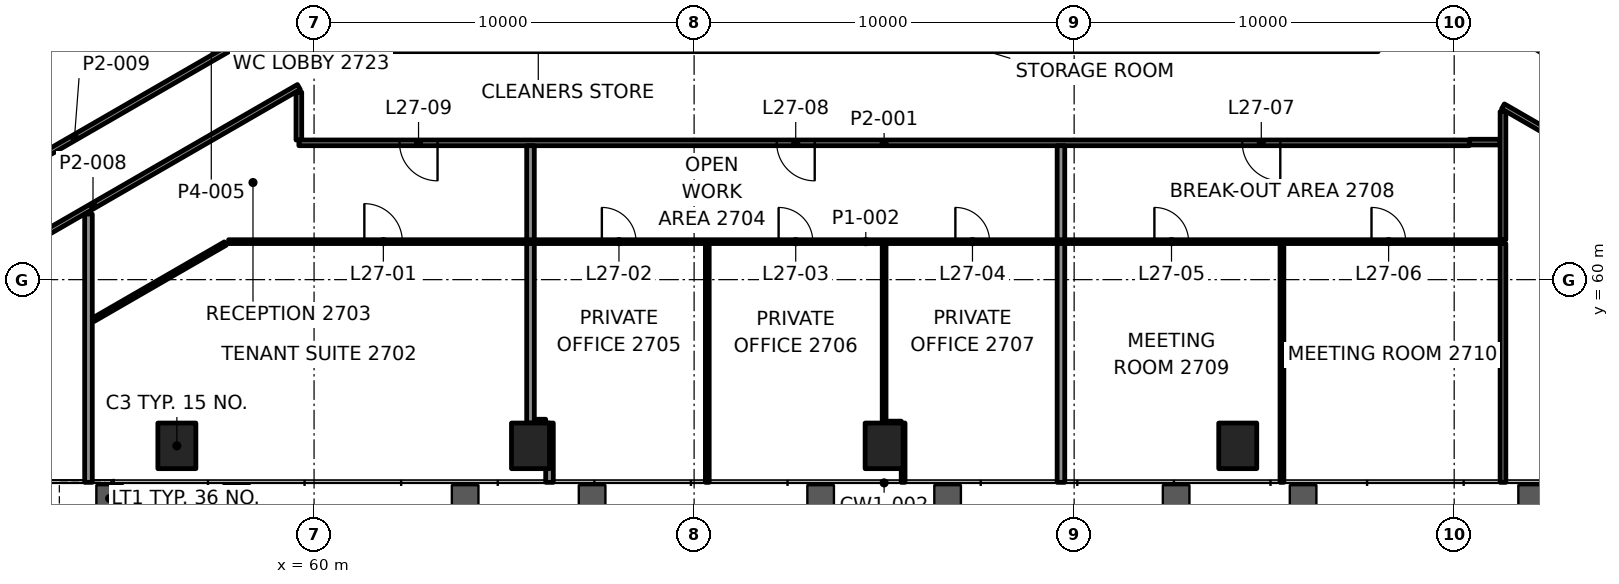
"""IFC4 building model, lengths in metres.
Left out: names, types, materials, properties, quantities, classifications, styles, units other than length and angle.
Written with IfcOpenShell. Run it as: python <this file> out.ifc"""

import sys

from ifc_helpers import new_model, si_unit, direction, frame, frame_2d, origin, origin_2d, place, context, subcontext, project, spatial, rectangle, extrude, element, fill, save


model = new_model("IFC4")
c1 = context("Model", 3, precision=1e-05, world=origin(), true_north=direction((0.0, 1.0)))
c2 = subcontext(c1, "Body", "Model", "MODEL_VIEW")
j1 = project(units=[si_unit("LENGTHUNIT", "METRE"), si_unit("PLANEANGLEUNIT", "RADIAN")], contexts=[c1])
p1 = place(None, origin())
s1 = spatial("IfcSite", under=j1, at=p1, CompositionType="ELEMENT")
p2 = place(p1, origin())
s2 = spatial("IfcBuilding", under=s1, at=p2, CompositionType="ELEMENT")
p3 = place(p2, frame((0.0, 0.0, 119.8)))
s3 = spatial("IfcBuildingStorey", under=s2, at=p3, CompositionType="ELEMENT", Elevation=119.8)
for number, where, z_axis, x_axis in (
    (1, (56.39, 55.626, -0.0), (0.0, 0.0, 1.0), (1.0, 0.0, 0.0)),
    (2, (65.695, 55.626, -0.0), (0.0, 0.0, 1.0), (1.0, 0.0, 0.0)),
    (3, (75.0, 55.626, -0.0), (0.0, 0.0, 1.0), (1.0, 0.0, 0.0)),
    (4, (84.305, 55.626, -0.0), (0.0, 0.0, 1.0), (1.0, 0.0, 0.0)),
):
    element("IfcColumn", number, at=place(p3, frame(where, z_axis=z_axis, x_axis=x_axis)), inside=s3, PredefinedType="COLUMN", context=c2, shape_type="SweptSolid", body=[
        extrude(rectangle(XDim=1.0, YDim=1.2, at=origin_2d()), origin(), (0.0, 0.0, 1.0), 4.2),
    ])
p4 = place(p3, frame((65.805, 56.226, 0.0), z_axis=(0.0, 0.0, 1.0), x_axis=(1.0, 0.0, 0.0)))
e5 = element("IfcWall", 5, at=p4, inside=s3, PredefinedType="PARTITIONING", context=c2, shape_type="SweptSolid", body=[
    extrude(rectangle(XDim=0.29, YDim=0.2, at=frame_2d((0.145, 0.0))), origin(), (0.0, 0.0, 1.0), 3.4),
])
p5 = place(p3, frame((75.05, 56.226, 0.0), z_axis=(0.0, 0.0, 1.0), x_axis=(1.0, 0.0, 0.0)))
e6 = element("IfcWall", 6, at=p5, inside=s3, PredefinedType="PARTITIONING", context=c2, shape_type="SweptSolid", body=[
    extrude(rectangle(XDim=0.4, YDim=0.1, at=frame_2d((0.2, 0.0))), origin(), (0.0, 0.0, 1.0), 3.4),
])
p6 = place(p3, frame((57.751, 61.0, 0.0), z_axis=(0.0, 0.0, 1.0), x_axis=(1.0, 0.0, 0.0)))
e7 = element("IfcWall", 7, at=p6, inside=s3, PredefinedType="PARTITIONING", context=c2, shape_type="SweptSolid", body=[
    extrude(rectangle(XDim=33.533, YDim=0.1, at=frame_2d((16.766, 0.0))), origin(), (0.0, 0.0, 1.0), 3.4),
])
p7 = place(p6, frame((3.572, 0.0, 0.0)))
e8 = element("IfcOpeningElement", 8, at=p7, cuts=e7, PredefinedType="OPENING", context=c2, shape_type="SweptSolid", body=[
    extrude(rectangle(XDim=1.0, YDim=2.1, at=frame_2d((0.5, 1.05))), frame((0.0, 0.06, 0.0), z_axis=(0.0, -1.0, 0.0), x_axis=(1.0, 0.0, 0.0)), (0.0, 0.0, 1.0), 0.12),
])
p8 = place(p6, frame((9.822, 0.0, 0.0)))
e9 = element("IfcOpeningElement", 9, at=p8, cuts=e7, PredefinedType="OPENING", context=c2, shape_type="SweptSolid", body=[
    extrude(rectangle(XDim=0.9, YDim=2.1, at=frame_2d((0.45, 1.05))), frame((0.0, 0.06, 0.0), z_axis=(0.0, -1.0, 0.0), x_axis=(1.0, 0.0, 0.0)), (0.0, 0.0, 1.0), 0.12),
])
p9 = place(p6, frame((14.472, 0.0, 0.0)))
e10 = element("IfcOpeningElement", 10, at=p9, cuts=e7, PredefinedType="OPENING", context=c2, shape_type="SweptSolid", body=[
    extrude(rectangle(XDim=0.9, YDim=2.1, at=frame_2d((0.45, 1.05))), frame((0.0, 0.06, 0.0), z_axis=(0.0, -1.0, 0.0), x_axis=(1.0, 0.0, 0.0)), (0.0, 0.0, 1.0), 0.12),
])
p10 = place(p6, frame((19.124, 0.0, 0.0)))
e11 = element("IfcOpeningElement", 11, at=p10, cuts=e7, PredefinedType="OPENING", context=c2, shape_type="SweptSolid", body=[
    extrude(rectangle(XDim=0.9, YDim=2.1, at=frame_2d((0.45, 1.05))), frame((0.0, 0.06, 0.0), z_axis=(0.0, -1.0, 0.0), x_axis=(1.0, 0.0, 0.0)), (0.0, 0.0, 1.0), 0.12),
])
p11 = place(p6, frame((24.361, 0.0, 0.0)))
e12 = element("IfcOpeningElement", 12, at=p11, cuts=e7, PredefinedType="OPENING", context=c2, shape_type="SweptSolid", body=[
    extrude(rectangle(XDim=0.9, YDim=2.1, at=frame_2d((0.45, 1.05))), frame((0.0, 0.06, 0.0), z_axis=(0.0, -1.0, 0.0), x_axis=(1.0, 0.0, 0.0)), (0.0, 0.0, 1.0), 0.12),
])
p12 = place(p6, frame((30.073, 0.0, 0.0)))
e13 = element("IfcOpeningElement", 13, at=p12, cuts=e7, PredefinedType="OPENING", context=c2, shape_type="SweptSolid", body=[
    extrude(rectangle(XDim=0.9, YDim=2.1, at=frame_2d((0.45, 1.05))), frame((0.0, 0.06, 0.0), z_axis=(0.0, -1.0, 0.0), x_axis=(1.0, 0.0, 0.0)), (0.0, 0.0, 1.0), 0.12),
])
p13 = place(p3, frame((90.399, 63.6, 0.0), z_axis=(0.0, 0.0, 1.0), x_axis=(-1.0, 0.0, 0.0)))
e14 = element("IfcWall", 14, at=p13, inside=s3, PredefinedType="PARTITIONING", context=c2, shape_type="SweptSolid", body=[
    extrude(rectangle(XDim=30.799, YDim=0.15, at=frame_2d((15.4, 0.0))), origin(), (0.0, 0.0, 1.0), 3.4),
])
p14 = place(p13, frame((4.975, 0.0, 0.0)))
e15 = element("IfcOpeningElement", 15, at=p14, cuts=e14, PredefinedType="OPENING", context=c2, shape_type="SweptSolid", body=[
    extrude(rectangle(XDim=1.0, YDim=2.1, at=frame_2d((0.5, 1.05))), frame((0.0, 0.085, 0.0), z_axis=(0.0, -1.0, 0.0), x_axis=(1.0, 0.0, 0.0)), (0.0, 0.0, 1.0), 0.17),
])
p15 = place(p13, frame((17.226, 0.0, 0.0)))
e16 = element("IfcOpeningElement", 16, at=p15, cuts=e14, PredefinedType="OPENING", context=c2, shape_type="SweptSolid", body=[
    extrude(rectangle(XDim=1.0, YDim=2.1, at=frame_2d((0.5, 1.05))), frame((0.0, 0.085, 0.0), z_axis=(0.0, -1.0, 0.0), x_axis=(1.0, 0.0, 0.0)), (0.0, 0.0, 1.0), 0.17),
])
p16 = place(p13, frame((27.151, 0.0, 0.0)))
e17 = element("IfcOpeningElement", 17, at=p16, cuts=e14, PredefinedType="OPENING", context=c2, shape_type="SweptSolid", body=[
    extrude(rectangle(XDim=1.0, YDim=2.1, at=frame_2d((0.5, 1.05))), frame((0.0, 0.085, 0.0), z_axis=(0.0, -1.0, 0.0), x_axis=(1.0, 0.0, 0.0)), (0.0, 0.0, 1.0), 0.17),
])
p17 = place(p3, frame((90.4, 63.619, 0.0), z_axis=(0.0, 0.0, 1.0), x_axis=(1.0, 0.0, 0.0)))
e18 = element("IfcWall", 18, at=p17, inside=s3, PredefinedType="PARTITIONING", context=c2, shape_type="SweptSolid", body=[
    extrude(rectangle(XDim=0.809, YDim=0.15, at=frame_2d((0.404, 0.0))), origin(), (0.0, 0.0, 1.0), 3.4),
])
p18 = place(p3, frame((54.189, 58.944, 0.0), z_axis=(0.0, 0.0, 1.0), x_axis=(0.866025502096, 0.499999829719, 0.0)))
e19 = element("IfcWall", 19, at=p18, inside=s3, PredefinedType="PARTITIONING", context=c2, shape_type="SweptSolid", body=[
    extrude(rectangle(XDim=4.013, YDim=0.1, at=frame_2d((2.006, 0.0))), origin(), (0.0, 0.0, 1.0), 3.4),
])
p19 = place(p3, frame((48.766, 58.815, 0.0), z_axis=(0.0, 0.0, 1.0), x_axis=(0.866028284225, 0.499995010897, 0.0)))
e20 = element("IfcWall", 20, at=p19, inside=s3, PredefinedType="PARTITIONING", context=c2, shape_type="SweptSolid", body=[
    extrude(rectangle(XDim=12.51, YDim=0.15, at=frame_2d((6.255, 0.0))), origin(), (0.0, 0.0, 1.0), 3.247),
])
p20 = place(p19, frame((2.66, 0.0, 0.0)))
e21 = element("IfcOpeningElement", 21, at=p20, cuts=e20, PredefinedType="OPENING", context=c2, shape_type="SweptSolid", body=[
    extrude(rectangle(XDim=1.0, YDim=2.1, at=frame_2d((0.5, 1.05))), frame((0.0, 0.085, 0.0), z_axis=(0.0, -1.0, 0.0), x_axis=(1.0, 0.0, 0.0)), (0.0, 0.0, 1.0), 0.17),
])
p21 = place(p3, frame((47.866, 60.374, 0.0), z_axis=(0.0, 0.0, 1.0), x_axis=(0.866031566243, 0.499989326157, 0.0)))
e22 = element("IfcWall", 22, at=p21, inside=s3, PredefinedType="PARTITIONING", context=c2, shape_type="SweptSolid", body=[
    extrude(rectangle(XDim=13.462, YDim=0.15, at=frame_2d((6.731, 0.0))), origin(), (0.0, 0.0, 1.0), 3.4),
])
p22 = place(p21, frame((11.774, 0.0, 0.0)))
e23 = element("IfcOpeningElement", 23, at=p22, cuts=e22, PredefinedType="OPENING", context=c2, shape_type="SweptSolid", body=[
    extrude(rectangle(XDim=1.2, YDim=2.1, at=frame_2d((0.6, 1.05))), frame((0.0, 0.085, 0.0), z_axis=(0.0, -1.0, 0.0), x_axis=(1.0, 0.0, 0.0)), (0.0, 0.0, 1.0), 0.17),
])
p23 = place(p3, frame((55.09, 67.547, 0.0), z_axis=(0.0, 0.0, 1.0), x_axis=(-0.8660245535, -0.500001472733, 0.0)))
e24 = element("IfcWall", 24, at=p23, inside=s3, PredefinedType="PARTITIONING", context=c2, shape_type="SweptSolid", body=[
    extrude(rectangle(XDim=6.968, YDim=0.1, at=frame_2d((3.484, 0.0))), origin(), (0.0, 0.0, 1.0), 3.4),
])
p24 = place(p23, frame((3.034, 0.0, 0.0)))
e25 = element("IfcOpeningElement", 25, at=p24, cuts=e24, PredefinedType="OPENING", context=c2, shape_type="SweptSolid", body=[
    extrude(rectangle(XDim=0.9, YDim=2.1, at=frame_2d((0.45, 1.05))), frame((0.0, 0.06, 0.0), z_axis=(0.0, -1.0, 0.0), x_axis=(1.0, 0.0, 0.0)), (0.0, 0.0, 1.0), 0.12),
])
p25 = place(p3, frame((91.284, 54.666, 0.0), z_axis=(0.0, 0.0, 1.0), x_axis=(0.0, 1.0, 0.0)))
e26 = element("IfcWall", 26, at=p25, inside=s3, PredefinedType="PARTITIONING", context=c2, shape_type="SweptSolid", body=[
    extrude(rectangle(XDim=6.284, YDim=0.15, at=frame_2d((3.142, 0.0))), origin(), (0.0, 0.0, 1.0), 3.165),
])
p26 = place(p3, frame((85.468, 54.666, 0.0), z_axis=(0.0, 0.0, 1.0), x_axis=(0.0, 1.0, 0.0)))
e27 = element("IfcWall", 27, at=p26, inside=s3, PredefinedType="PARTITIONING", context=c2, shape_type="SweptSolid", body=[
    extrude(rectangle(XDim=6.284, YDim=0.1, at=frame_2d((3.142, 0.0))), origin(), (0.0, 0.0, 1.0), 3.165),
])
p27 = place(p3, frame((79.653, 54.666, 0.0), z_axis=(0.0, 0.0, 1.0), x_axis=(0.0, 1.0, 0.0)))
e28 = element("IfcWall", 28, at=p27, inside=s3, PredefinedType="PARTITIONING", context=c2, shape_type="SweptSolid", body=[
    extrude(rectangle(XDim=6.284, YDim=0.2, at=frame_2d((3.142, 0.0))), origin(), (0.0, 0.0, 1.0), 3.165),
])
p28 = place(p3, frame((75.5, 54.666, 0.0), z_axis=(0.0, 0.0, 1.0), x_axis=(0.0, 1.0, 0.0)))
e29 = element("IfcWall", 29, at=p28, inside=s3, PredefinedType="PARTITIONING", context=c2, shape_type="SweptSolid", body=[
    extrude(rectangle(XDim=1.56, YDim=0.1, at=frame_2d((0.78, 0.0))), origin(), (0.0, 0.0, 1.0), 3.165),
])
p29 = place(p3, frame((75.0, 56.226, 0.0), z_axis=(0.0, 0.0, 1.0), x_axis=(0.0, 1.0, 0.0)))
e30 = element("IfcWall", 30, at=p29, inside=s3, PredefinedType="PARTITIONING", context=c2, shape_type="SweptSolid", body=[
    extrude(rectangle(XDim=4.724, YDim=0.1, at=frame_2d((2.362, 0.0))), origin(), (0.0, 0.0, 1.0), 3.4),
])
p30 = place(p3, frame((70.347, 54.666, 0.0), z_axis=(0.0, 0.0, 1.0), x_axis=(0.0, 1.0, 0.0)))
e31 = element("IfcWall", 31, at=p30, inside=s3, PredefinedType="PARTITIONING", context=c2, shape_type="SweptSolid", body=[
    extrude(rectangle(XDim=6.284, YDim=0.1, at=frame_2d((3.142, 0.0))), origin(), (0.0, 0.0, 1.0), 3.165),
])
p31 = place(p3, frame((66.195, 54.666, 0.0), z_axis=(0.0, 0.0, 1.0), x_axis=(0.0, 1.0, 0.0)))
e32 = element("IfcWall", 32, at=p31, inside=s3, PredefinedType="PARTITIONING", context=c2, shape_type="SweptSolid", body=[
    extrude(rectangle(XDim=1.56, YDim=0.2, at=frame_2d((0.78, 0.0))), origin(), (0.0, 0.0, 1.0), 3.165),
])
p32 = place(p3, frame((65.695, 56.226, 0.0), z_axis=(0.0, 0.0, 1.0), x_axis=(0.0, 1.0, 0.0)))
e33 = element("IfcWall", 33, at=p32, inside=s3, PredefinedType="PARTITIONING", context=c2, shape_type="SweptSolid", body=[
    extrude(rectangle(XDim=4.724, YDim=0.2, at=frame_2d((2.362, 0.0))), origin(), (0.0, 0.0, 1.0), 3.4),
])
p33 = place(p3, frame((59.6, 63.675, 0.0), z_axis=(0.0, 0.0, 1.0), x_axis=(0.0, 1.0, 0.0)))
e34 = element("IfcWall", 34, at=p33, inside=s3, PredefinedType="PARTITIONING", context=c2, shape_type="SweptSolid", body=[
    extrude(rectangle(XDim=1.258, YDim=0.15, at=frame_2d((0.629, 0.0))), origin(), (0.0, 0.0, 1.0), 3.247),
])
p34 = place(p3, frame((54.064, 54.666, 0.0), z_axis=(0.0, 0.0, 1.0), x_axis=(0.0, 1.0, 0.0)))
e35 = element("IfcWall", 35, at=p34, inside=s3, PredefinedType="PARTITIONING", context=c2, shape_type="SweptSolid", body=[
    extrude(rectangle(XDim=7.06, YDim=0.2, at=frame_2d((3.53, 0.0))), origin(), (0.0, 0.0, 1.0), 3.4),
])
p35 = place(p3, frame((102.134, 60.374, 0.0), z_axis=(0.0, 0.0, 1.0), x_axis=(-0.86602824724, 0.499995074959, 0.0)))
e36 = element("IfcWall", 36, at=p35, inside=s3, PredefinedType="PARTITIONING", context=c2, shape_type="SweptSolid", body=[
    extrude(rectangle(XDim=13.463, YDim=0.15, at=frame_2d((6.731, 0.0))), origin(), (0.0, 0.0, 1.0), 3.4),
])
p36 = place(p3, frame((101.234, 58.815, 0.0), z_axis=(0.0, 0.0, 1.0), x_axis=(-0.866028466704, 0.49999469483, 0.0)))
e37 = element("IfcWall", 37, at=p36, inside=s3, PredefinedType="PARTITIONING", context=c2, shape_type="SweptSolid", body=[
    extrude(rectangle(XDim=11.489, YDim=0.15, at=frame_2d((5.744, 0.0))), origin(), (0.0, 0.0, 1.0), 3.247),
])
p37 = place(p36, frame((5.294, 0.0, 0.0)))
e38 = element("IfcOpeningElement", 38, at=p37, cuts=e37, PredefinedType="OPENING", context=c2, shape_type="SweptSolid", body=[
    extrude(rectangle(XDim=0.9, YDim=2.1, at=frame_2d((0.45, 1.05))), frame((0.0, 0.085, 0.0), z_axis=(0.0, -1.0, 0.0), x_axis=(1.0, 0.0, 0.0)), (0.0, 0.0, 1.0), 0.17),
])
p38 = place(p3, frame((91.284, 61.05, 0.0), z_axis=(0.0, 0.0, 1.0), x_axis=(0.0, 1.0, 0.0)))
e39 = element("IfcWall", 39, at=p38, inside=s3, PredefinedType="PARTITIONING", context=c2, shape_type="SweptSolid", body=[
    extrude(rectangle(XDim=3.373, YDim=0.15, at=frame_2d((1.686, 0.0))), origin(), (0.0, 0.0, 1.0), 3.247),
])
for number, where, z_axis, x_axis in (
    (40, (79.653, 61.05, 0.0), (0.0, 0.0, 1.0), (0.0, 1.0, 0.0)),
    (41, (65.695, 61.05, 0.0), (0.0, 0.0, 1.0), (0.0, 1.0, 0.0)),
):
    element("IfcWall", number, at=place(p3, frame(where, z_axis=z_axis, x_axis=x_axis)), inside=s3, PredefinedType="PARTITIONING", context=c2, shape_type="SweptSolid", body=[
        extrude(rectangle(XDim=2.475, YDim=0.2, at=frame_2d((1.237, 0.0))), origin(), (0.0, 0.0, 1.0), 3.4),
    ])
p39 = place(p3, frame((69.117, 112.258, 0.0), z_axis=(0.0, 0.0, 1.0), x_axis=(-0.500000992643, -0.866024830681, 0.0)))
e42 = element("IfcWall", 42, at=p39, inside=s3, PredefinedType="SOLIDWALL", context=c2, shape_type="SweptSolid", body=[
    extrude(rectangle(XDim=58.649, YDim=0.8, at=frame_2d((29.325, 0.0))), origin(), (0.0, 0.0, 1.0), 0.9),
])
p40 = place(p7, origin())
e43 = element("IfcDoor", 43, at=p40, inside=s3, OperationType="SINGLE_SWING_LEFT", PredefinedType="DOOR", context=c2, shape_type="SweptSolid", body=[
    extrude(rectangle(XDim=1.0, YDim=2.1, at=frame_2d((0.5, 1.05))), frame((0.0, 0.025, 0.0), z_axis=(0.0, -1.0, 0.0), x_axis=(1.0, 0.0, 0.0)), (0.0, 0.0, 1.0), 0.05),
])
fill(e8, e43)
p41 = place(p8, origin())
e44 = element("IfcDoor", 44, at=p41, inside=s3, OperationType="SINGLE_SWING_RIGHT", PredefinedType="DOOR", context=c2, shape_type="SweptSolid", body=[
    extrude(rectangle(XDim=0.9, YDim=2.1, at=frame_2d((0.45, 1.05))), frame((0.0, 0.025, 0.0), z_axis=(0.0, -1.0, 0.0), x_axis=(1.0, 0.0, 0.0)), (0.0, 0.0, 1.0), 0.05),
])
fill(e9, e44)
p42 = place(p9, origin())
e45 = element("IfcDoor", 45, at=p42, inside=s3, OperationType="SINGLE_SWING_LEFT", PredefinedType="DOOR", context=c2, shape_type="SweptSolid", body=[
    extrude(rectangle(XDim=0.9, YDim=2.1, at=frame_2d((0.45, 1.05))), frame((0.0, 0.025, 0.0), z_axis=(0.0, -1.0, 0.0), x_axis=(1.0, 0.0, 0.0)), (0.0, 0.0, 1.0), 0.05),
])
fill(e10, e45)
p43 = place(p10, origin())
e46 = element("IfcDoor", 46, at=p43, inside=s3, OperationType="SINGLE_SWING_RIGHT", PredefinedType="DOOR", context=c2, shape_type="SweptSolid", body=[
    extrude(rectangle(XDim=0.9, YDim=2.1, at=frame_2d((0.45, 1.05))), frame((0.0, 0.025, 0.0), z_axis=(0.0, -1.0, 0.0), x_axis=(1.0, 0.0, 0.0)), (0.0, 0.0, 1.0), 0.05),
])
fill(e11, e46)
p44 = place(p11, origin())
e47 = element("IfcDoor", 47, at=p44, inside=s3, OperationType="SINGLE_SWING_RIGHT", PredefinedType="DOOR", context=c2, shape_type="SweptSolid", body=[
    extrude(rectangle(XDim=0.9, YDim=2.1, at=frame_2d((0.45, 1.05))), frame((0.0, 0.025, 0.0), z_axis=(0.0, -1.0, 0.0), x_axis=(1.0, 0.0, 0.0)), (0.0, 0.0, 1.0), 0.05),
])
fill(e12, e47)
p45 = place(p12, origin())
e48 = element("IfcDoor", 48, at=p45, inside=s3, OperationType="SINGLE_SWING_LEFT", PredefinedType="DOOR", context=c2, shape_type="SweptSolid", body=[
    extrude(rectangle(XDim=0.9, YDim=2.1, at=frame_2d((0.45, 1.05))), frame((0.0, 0.025, 0.0), z_axis=(0.0, -1.0, 0.0), x_axis=(1.0, 0.0, 0.0)), (0.0, 0.0, 1.0), 0.05),
])
fill(e13, e48)
p46 = place(p14, origin())
e49 = element("IfcDoor", 49, at=p46, inside=s3, OperationType="SINGLE_SWING_RIGHT", PredefinedType="DOOR", context=c2, shape_type="SweptSolid", body=[
    extrude(rectangle(XDim=1.0, YDim=2.1, at=frame_2d((0.5, 1.05))), frame((0.0, 0.025, 0.0), z_axis=(0.0, -1.0, 0.0), x_axis=(1.0, 0.0, 0.0)), (0.0, 0.0, 1.0), 0.05),
])
fill(e15, e49)
p47 = place(p15, origin())
e50 = element("IfcDoor", 50, at=p47, inside=s3, OperationType="SINGLE_SWING_RIGHT", PredefinedType="DOOR", context=c2, shape_type="SweptSolid", body=[
    extrude(rectangle(XDim=1.0, YDim=2.1, at=frame_2d((0.5, 1.05))), frame((0.0, 0.025, 0.0), z_axis=(0.0, -1.0, 0.0), x_axis=(1.0, 0.0, 0.0)), (0.0, 0.0, 1.0), 0.05),
])
fill(e16, e50)
p48 = place(p16, origin())
e51 = element("IfcDoor", 51, at=p48, inside=s3, OperationType="SINGLE_SWING_LEFT", PredefinedType="DOOR", context=c2, shape_type="SweptSolid", body=[
    extrude(rectangle(XDim=1.0, YDim=2.1, at=frame_2d((0.5, 1.05))), frame((0.0, 0.025, 0.0), z_axis=(0.0, -1.0, 0.0), x_axis=(1.0, 0.0, 0.0)), (0.0, 0.0, 1.0), 0.05),
])
fill(e17, e51)
save(model, sys.argv[1])
